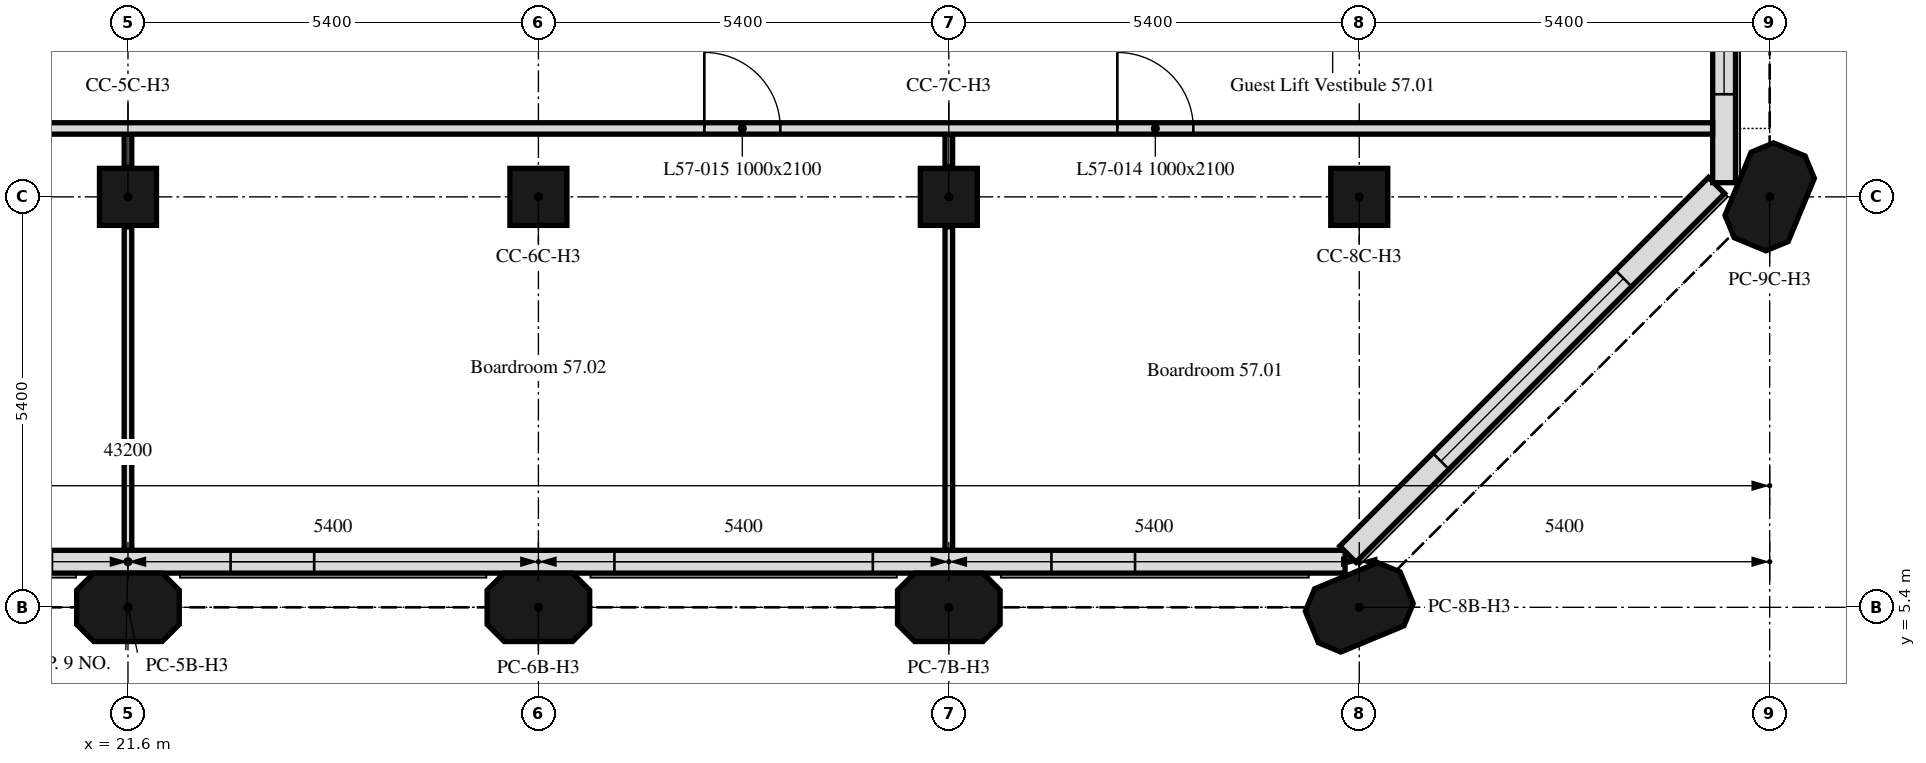
"""IFC4 building model, lengths in metres.
Left out: names, types, materials, properties, quantities, classifications, styles, units other than length and angle.
Written with IfcOpenShell. Run it as: python <this file> out.ifc"""

import sys

from ifc_helpers import new_model, si_unit, direction, frame, frame_2d, origin, origin_2d, place, context, subcontext, project, spatial, polyline, rectangle, outline, extrude, element, fill, save


model = new_model("IFC4")
c1 = context("Model", 3, precision=1e-05, world=origin(), true_north=direction((0.0, 1.0)))
c2 = subcontext(c1, "Body", "Model", "MODEL_VIEW")
j1 = project(units=[si_unit("LENGTHUNIT", "METRE"), si_unit("PLANEANGLEUNIT", "RADIAN")], contexts=[c1])
p1 = place(None, origin())
s1 = spatial("IfcSite", under=j1, at=p1, CompositionType="ELEMENT")
p2 = place(p1, origin())
s2 = spatial("IfcBuilding", under=s1, at=p2, CompositionType="ELEMENT")
p3 = place(p2, frame((0.0, 0.0, 226.9)))
s3 = spatial("IfcBuildingStorey", under=s2, at=p3, CompositionType="ELEMENT", Elevation=226.9)
for number, where, z_axis, x_axis in (
    (1, (21.6, 5.4, 0.0), (0.0, 0.0, 1.0), (1.0, 0.0, 0.0)),
    (2, (27.0, 5.4, 0.0), (0.0, 0.0, 1.0), (1.0, 0.0, 0.0)),
    (3, (32.4, 5.4, 0.0), (0.0, 0.0, 1.0), (1.0, 0.0, 0.0)),
    (4, (37.8, 5.4, 0.0), (0.0, 0.0, 1.0), (0.924, 0.383, 0.0)),
):
    element("IfcColumn", number, at=place(p3, frame(where, z_axis=z_axis, x_axis=x_axis)), inside=s3, PredefinedType="COLUMN", context=c2, shape_type="SweptSolid", body=[
        extrude(outline(polyline([(-0.45, -0.45), (0.45, -0.45), (0.675, -0.225), (0.675, 0.225), (0.45, 0.45), (-0.45, 0.45), (-0.675, 0.225), (-0.675, -0.225), (-0.45, -0.45)])), origin(), (0.0, 0.0, 1.0), 3.0),
    ])
for number, where, z_axis, x_axis in (
    (5, (21.6, 10.8, 0.0), (0.0, 0.0, 1.0), (1.0, 0.0, 0.0)),
    (6, (27.0, 10.8, 0.0), (0.0, 0.0, 1.0), (1.0, 0.0, 0.0)),
    (7, (32.4, 10.8, 0.0), (0.0, 0.0, 1.0), (1.0, 0.0, 0.0)),
    (8, (37.8, 10.8, 0.0), (0.0, 0.0, 1.0), (1.0, 0.0, 0.0)),
):
    element("IfcColumn", number, at=place(p3, frame(where, z_axis=z_axis, x_axis=x_axis)), inside=s3, PredefinedType="COLUMN", context=c2, shape_type="SweptSolid", body=[
        extrude(rectangle(XDim=0.75, YDim=0.75, at=origin_2d()), origin(), (0.0, 0.0, 1.0), 3.0),
    ])
p4 = place(p3, frame((43.2, 10.8, 0.0), z_axis=(0.0, 0.0, 1.0), x_axis=(0.382683432365, 0.923879532511, 0.0)))
e9 = element("IfcColumn", 9, at=p4, inside=s3, PredefinedType="COLUMN", context=c2, shape_type="SweptSolid", body=[
    extrude(outline(polyline([(-0.45, -0.45), (0.45, -0.45), (0.675, -0.225), (0.675, 0.225), (0.45, 0.45), (-0.45, 0.45), (-0.675, 0.225), (-0.675, -0.225), (-0.45, -0.45)])), origin(), (0.0, 0.0, 1.0), 3.0),
])
p5 = place(p3, frame((5.586, 6.0, 0.0), z_axis=(0.0, 0.0, 1.0), x_axis=(1.0, 0.0, 0.0)))
e10 = element("IfcWall", 10, at=p5, inside=s3, PredefinedType="SOLIDWALL", context=c2, shape_type="SweptSolid", body=[
    extrude(rectangle(XDim=32.027, YDim=0.3, at=frame_2d((16.014, 0.0))), origin(), (0.0, 0.0, 1.0), 3.0),
])
p6 = place(p5, frame((0.814, 0.0, 0.9)))
e11 = element("IfcOpeningElement", 11, at=p6, cuts=e10, PredefinedType="OPENING", context=c2, shape_type="SweptSolid", body=[
    extrude(rectangle(XDim=3.4, YDim=1.7, at=frame_2d((1.7, 0.85))), frame((0.0, 0.16, 0.0), z_axis=(0.0, -1.0, 0.0), x_axis=(1.0, 0.0, 0.0)), (0.0, 0.0, 1.0), 0.32),
])
p7 = place(p5, frame((6.564, 0.0, 0.9)))
e12 = element("IfcOpeningElement", 12, at=p7, cuts=e10, PredefinedType="OPENING", context=c2, shape_type="SweptSolid", body=[
    extrude(rectangle(XDim=1.1, YDim=1.7, at=frame_2d((0.55, 0.85))), frame((0.0, 0.16, 0.0), z_axis=(0.0, -1.0, 0.0), x_axis=(1.0, 0.0, 0.0)), (0.0, 0.0, 1.0), 0.32),
])
p8 = place(p5, frame((11.614, 0.0, 0.9)))
e13 = element("IfcOpeningElement", 13, at=p8, cuts=e10, PredefinedType="OPENING", context=c2, shape_type="SweptSolid", body=[
    extrude(rectangle(XDim=3.4, YDim=1.7, at=frame_2d((1.7, 0.85))), frame((0.0, 0.16, 0.0), z_axis=(0.0, -1.0, 0.0), x_axis=(1.0, 0.0, 0.0)), (0.0, 0.0, 1.0), 0.32),
])
p9 = place(p5, frame((17.364, 0.0, 0.9)))
e14 = element("IfcOpeningElement", 14, at=p9, cuts=e10, PredefinedType="OPENING", context=c2, shape_type="SweptSolid", body=[
    extrude(rectangle(XDim=1.1, YDim=1.7, at=frame_2d((0.55, 0.85))), frame((0.0, 0.16, 0.0), z_axis=(0.0, -1.0, 0.0), x_axis=(1.0, 0.0, 0.0)), (0.0, 0.0, 1.0), 0.32),
])
p10 = place(p5, frame((22.414, 0.0, 0.9)))
e15 = element("IfcOpeningElement", 15, at=p10, cuts=e10, PredefinedType="OPENING", context=c2, shape_type="SweptSolid", body=[
    extrude(rectangle(XDim=3.4, YDim=1.7, at=frame_2d((1.7, 0.85))), frame((0.0, 0.16, 0.0), z_axis=(0.0, -1.0, 0.0), x_axis=(1.0, 0.0, 0.0)), (0.0, 0.0, 1.0), 0.32),
])
p11 = place(p5, frame((28.164, 0.0, 0.9)))
e16 = element("IfcOpeningElement", 16, at=p11, cuts=e10, PredefinedType="OPENING", context=c2, shape_type="SweptSolid", body=[
    extrude(rectangle(XDim=1.1, YDim=1.7, at=frame_2d((0.55, 0.85))), frame((0.0, 0.16, 0.0), z_axis=(0.0, -1.0, 0.0), x_axis=(1.0, 0.0, 0.0)), (0.0, 0.0, 1.0), 0.32),
])
p12 = place(p3, frame((37.65, 6.099, 0.0), z_axis=(0.0, 0.0, 1.0), x_axis=(0.707106781187, 0.707106781187, 0.0)))
e17 = element("IfcWall", 17, at=p12, inside=s3, PredefinedType="SOLIDWALL", context=c2, shape_type="SweptSolid", body=[
    extrude(rectangle(XDim=6.86, YDim=0.3, at=frame_2d((3.43, 0.0))), origin(), (0.0, 0.0, 1.0), 3.0),
])
p13 = place(p12, frame((1.73, 0.0, 0.9)))
e18 = element("IfcOpeningElement", 18, at=p13, cuts=e17, PredefinedType="OPENING", context=c2, shape_type="SweptSolid", body=[
    extrude(rectangle(XDim=3.4, YDim=1.7, at=frame_2d((1.7, 0.85))), frame((0.0, 0.16, 0.0), z_axis=(0.0, -1.0, 0.0), x_axis=(1.0, 0.0, 0.0)), (0.0, 0.0, 1.0), 0.32),
])
p14 = place(p3, frame((42.6, 10.986, 0.0), z_axis=(0.0, 0.0, 1.0), x_axis=(0.0, 1.0, 0.0)))
e19 = element("IfcWall", 19, at=p14, inside=s3, PredefinedType="SOLIDWALL", context=c2, shape_type="SweptSolid", body=[
    extrude(rectangle(XDim=5.214, YDim=0.3, at=frame_2d((2.607, 0.0))), origin(), (0.0, 0.0, 1.0), 3.0),
])
p15 = place(p14, frame((1.164, 0.0, 0.9)))
e20 = element("IfcOpeningElement", 20, at=p15, cuts=e19, PredefinedType="OPENING", context=c2, shape_type="SweptSolid", body=[
    extrude(rectangle(XDim=1.1, YDim=1.7, at=frame_2d((0.55, 0.85))), frame((0.0, 0.16, 0.0), z_axis=(0.0, -1.0, 0.0), x_axis=(1.0, 0.0, 0.0)), (0.0, 0.0, 1.0), 0.32),
])
p16 = place(p14, frame((2.764, 0.0, 0.9)))
e21 = element("IfcOpeningElement", 21, at=p16, cuts=e19, PredefinedType="OPENING", context=c2, shape_type="SweptSolid", body=[
    extrude(rectangle(XDim=1.1, YDim=1.7, at=frame_2d((0.55, 0.85))), frame((0.0, 0.16, 0.0), z_axis=(0.0, -1.0, 0.0), x_axis=(1.0, 0.0, 0.0)), (0.0, 0.0, 1.0), 0.32),
])
p17 = place(p3, frame((32.4, 11.625, 0.0), z_axis=(0.0, 0.0, 1.0), x_axis=(0.0, -1.0, 0.0)))
e22 = element("IfcWall", 22, at=p17, inside=s3, PredefinedType="PARTITIONING", context=c2, shape_type="SweptSolid", body=[
    extrude(rectangle(XDim=0.43, YDim=0.1, at=frame_2d((0.215, 0.0))), origin(), (0.0, 0.0, 1.0), 3.0),
])
p18 = place(p3, frame((32.4, 10.405, 0.0), z_axis=(0.0, 0.0, 1.0), x_axis=(0.0, -1.0, 0.0)))
e23 = element("IfcWall", 23, at=p18, inside=s3, PredefinedType="PARTITIONING", context=c2, shape_type="SweptSolid", body=[
    extrude(rectangle(XDim=4.254, YDim=0.1, at=frame_2d((2.127, 0.0))), origin(), (0.0, 0.0, 1.0), 3.0),
])
p19 = place(p3, frame((21.6, 11.625, 0.0), z_axis=(0.0, 0.0, 1.0), x_axis=(0.0, -1.0, 0.0)))
e24 = element("IfcWall", 24, at=p19, inside=s3, PredefinedType="PARTITIONING", context=c2, shape_type="SweptSolid", body=[
    extrude(rectangle(XDim=0.43, YDim=0.1, at=frame_2d((0.215, 0.0))), origin(), (0.0, 0.0, 1.0), 3.0),
])
p20 = place(p3, frame((21.6, 10.405, 0.0), z_axis=(0.0, 0.0, 1.0), x_axis=(0.0, -1.0, 0.0)))
e25 = element("IfcWall", 25, at=p20, inside=s3, PredefinedType="PARTITIONING", context=c2, shape_type="SweptSolid", body=[
    extrude(rectangle(XDim=4.254, YDim=0.1, at=frame_2d((2.127, 0.0))), origin(), (0.0, 0.0, 1.0), 3.0),
])
p21 = place(p3, frame((0.751, 11.7, 0.0), z_axis=(0.0, 0.0, 1.0), x_axis=(1.0, 0.0, 0.0)))
e26 = element("IfcWall", 26, at=p21, inside=s3, PredefinedType="PARTITIONING", context=c2, shape_type="SweptSolid", body=[
    extrude(rectangle(XDim=41.698, YDim=0.15, at=frame_2d((20.849, 0.0))), origin(), (0.0, 0.0, 1.0), 3.0),
])
p22 = place(p21, frame((33.866, 0.0, 0.0)))
e27 = element("IfcOpeningElement", 27, at=p22, cuts=e26, PredefinedType="OPENING", context=c2, shape_type="SweptSolid", body=[
    extrude(rectangle(XDim=1.0, YDim=2.1, at=frame_2d((0.5, 1.05))), frame((0.0, 0.075, 0.0), z_axis=(0.0, -1.0, 0.0), x_axis=(1.0, 0.0, 0.0)), (0.0, 0.0, 1.0), 0.15),
])
p23 = place(p21, frame((28.432, 0.0, 0.0)))
e28 = element("IfcOpeningElement", 28, at=p23, cuts=e26, PredefinedType="OPENING", context=c2, shape_type="SweptSolid", body=[
    extrude(rectangle(XDim=1.0, YDim=2.1, at=frame_2d((0.5, 1.05))), frame((0.0, 0.075, 0.0), z_axis=(0.0, -1.0, 0.0), x_axis=(1.0, 0.0, 0.0)), (0.0, 0.0, 1.0), 0.15),
])
p24 = place(p21, frame((12.266, 0.0, 0.0)))
e29 = element("IfcOpeningElement", 29, at=p24, cuts=e26, PredefinedType="OPENING", context=c2, shape_type="SweptSolid", body=[
    extrude(rectangle(XDim=1.0, YDim=2.1, at=frame_2d((0.5, 1.05))), frame((0.0, 0.075, 0.0), z_axis=(0.0, -1.0, 0.0), x_axis=(1.0, 0.0, 0.0)), (0.0, 0.0, 1.0), 0.15),
])
p25 = place(p21, frame((2.744, 0.0, 0.0)))
e30 = element("IfcOpeningElement", 30, at=p25, cuts=e26, PredefinedType="OPENING", context=c2, shape_type="SweptSolid", body=[
    extrude(rectangle(XDim=1.0, YDim=2.1, at=frame_2d((0.5, 1.05))), frame((0.0, 0.075, 0.0), z_axis=(0.0, -1.0, 0.0), x_axis=(1.0, 0.0, 0.0)), (0.0, 0.0, 1.0), 0.15),
])
p26 = place(p9, origin())
e31 = element("IfcWindow", 31, at=p26, inside=s3, PartitioningType="SINGLE_PANEL", PredefinedType="WINDOW", context=c2, shape_type="SweptSolid", body=[
    extrude(rectangle(XDim=1.1, YDim=1.7, at=frame_2d((0.55, 0.85))), frame((0.0, 0.03, 0.0), z_axis=(0.0, -1.0, 0.0), x_axis=(1.0, 0.0, 0.0)), (0.0, 0.0, 1.0), 0.06),
])
fill(e14, e31)
p27 = place(p10, origin())
e32 = element("IfcWindow", 32, at=p27, inside=s3, PartitioningType="SINGLE_PANEL", PredefinedType="WINDOW", context=c2, shape_type="SweptSolid", body=[
    extrude(rectangle(XDim=3.4, YDim=1.7, at=frame_2d((1.7, 0.85))), frame((0.0, 0.03, 0.0), z_axis=(0.0, -1.0, 0.0), x_axis=(1.0, 0.0, 0.0)), (0.0, 0.0, 1.0), 0.06),
])
fill(e15, e32)
p28 = place(p11, origin())
e33 = element("IfcWindow", 33, at=p28, inside=s3, PartitioningType="SINGLE_PANEL", PredefinedType="WINDOW", context=c2, shape_type="SweptSolid", body=[
    extrude(rectangle(XDim=1.1, YDim=1.7, at=frame_2d((0.55, 0.85))), frame((0.0, 0.03, 0.0), z_axis=(0.0, -1.0, 0.0), x_axis=(1.0, 0.0, 0.0)), (0.0, 0.0, 1.0), 0.06),
])
fill(e16, e33)
p29 = place(p13, origin())
e34 = element("IfcWindow", 34, at=p29, inside=s3, PartitioningType="SINGLE_PANEL", PredefinedType="WINDOW", context=c2, shape_type="SweptSolid", body=[
    extrude(rectangle(XDim=3.4, YDim=1.7, at=frame_2d((1.7, 0.85))), frame((0.0, 0.03, 0.0), z_axis=(0.0, -1.0, 0.0), x_axis=(1.0, 0.0, 0.0)), (0.0, 0.0, 1.0), 0.06),
])
fill(e18, e34)
p30 = place(p15, origin())
e35 = element("IfcWindow", 35, at=p30, inside=s3, PartitioningType="SINGLE_PANEL", PredefinedType="WINDOW", context=c2, shape_type="SweptSolid", body=[
    extrude(rectangle(XDim=1.1, YDim=1.7, at=frame_2d((0.55, 0.85))), frame((0.0, 0.03, 0.0), z_axis=(0.0, -1.0, 0.0), x_axis=(1.0, 0.0, 0.0)), (0.0, 0.0, 1.0), 0.06),
])
fill(e20, e35)
p31 = place(p22, origin())
e36 = element("IfcDoor", 36, at=p31, inside=s3, OperationType="SINGLE_SWING_RIGHT", PredefinedType="DOOR", context=c2, shape_type="SweptSolid", body=[
    extrude(rectangle(XDim=1.0, YDim=2.1, at=frame_2d((0.5, 1.05))), frame((0.0, 0.025, 0.0), z_axis=(0.0, -1.0, 0.0), x_axis=(1.0, 0.0, 0.0)), (0.0, 0.0, 1.0), 0.05),
])
fill(e27, e36)
p32 = place(p23, origin())
e37 = element("IfcDoor", 37, at=p32, inside=s3, OperationType="SINGLE_SWING_LEFT", PredefinedType="DOOR", context=c2, shape_type="SweptSolid", body=[
    extrude(rectangle(XDim=1.0, YDim=2.1, at=frame_2d((0.5, 1.05))), frame((0.0, 0.025, 0.0), z_axis=(0.0, -1.0, 0.0), x_axis=(1.0, 0.0, 0.0)), (0.0, 0.0, 1.0), 0.05),
])
fill(e28, e37)
save(model, sys.argv[1])
